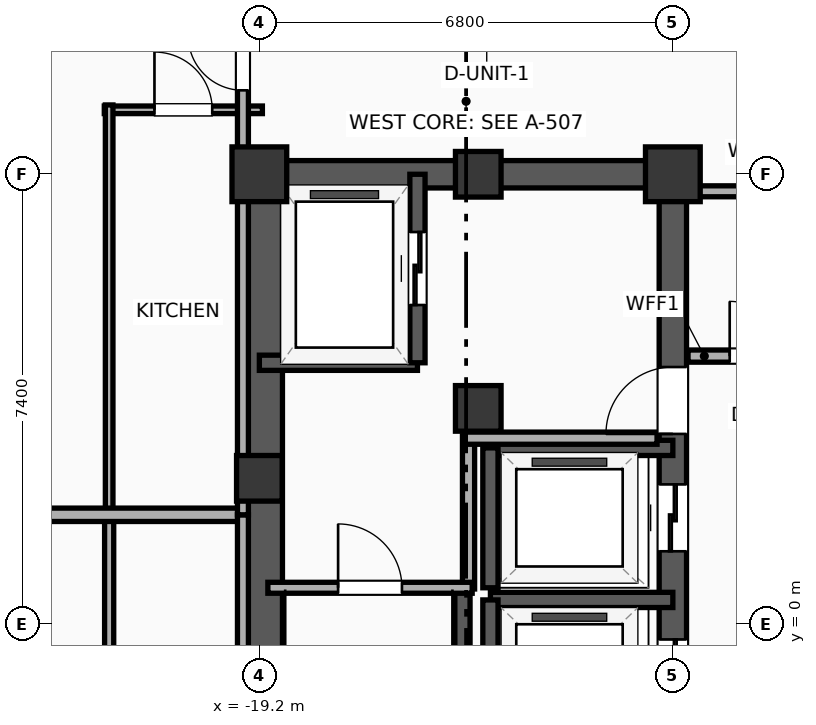
"""IFC4 building model, lengths in metres.
Left out: names, types, materials, properties, quantities, classifications, styles, units other than length and angle.
Written with IfcOpenShell. Run it as: python <this file> out.ifc"""

import sys

from ifc_helpers import new_model, si_unit, direction, frame, frame_2d, origin, origin_2d, place, context, subcontext, project, spatial, rectangle, extrude, element, fill, save


model = new_model("IFC4")
c1 = context("Model", 3, precision=1e-05, world=origin(), true_north=direction((0.0, 1.0)))
c2 = subcontext(c1, "Body", "Model", "MODEL_VIEW")
j1 = project(units=[si_unit("LENGTHUNIT", "METRE"), si_unit("PLANEANGLEUNIT", "RADIAN")], contexts=[c1])
p1 = place(None, origin())
s1 = spatial("IfcSite", under=j1, at=p1, CompositionType="ELEMENT")
p2 = place(p1, origin())
s2 = spatial("IfcBuilding", under=s1, at=p2, CompositionType="ELEMENT")
p3 = place(p2, frame((0.0, 0.0, 200.2)))
s3 = spatial("IfcBuildingStorey", under=s2, at=p3, CompositionType="ELEMENT", Elevation=200.2)
p4 = place(p3, frame((-19.2, 2.4, 0.0), z_axis=(0.0, 0.0, 1.0), x_axis=(1.0, 0.0, 0.0)))
e1 = element("IfcColumn", 1, at=p4, inside=s3, PredefinedType="COLUMN", context=c2, shape_type="SweptSolid", body=[
    extrude(rectangle(XDim=0.75, YDim=0.75, at=origin_2d()), origin(), (0.0, 0.0, 1.0), 3.9),
])
p5 = place(p3, frame((-19.2, 7.4, 0.0), z_axis=(0.0, 0.0, 1.0), x_axis=(1.0, 0.0, 0.0)))
e2 = element("IfcColumn", 2, at=p5, inside=s3, PredefinedType="COLUMN", context=c2, shape_type="SweptSolid", body=[
    extrude(rectangle(XDim=0.9, YDim=0.9, at=origin_2d()), origin(), (0.0, 0.0, 1.0), 3.9),
])
for number, where, z_axis, x_axis in (
    (3, (-15.6, 7.4, 0.0), (0.0, 0.0, 1.0), (1.0, 0.0, 0.0)),
    (4, (-15.6, 3.55, 0.0), (0.0, 0.0, 1.0), (1.0, 0.0, 0.0)),
):
    element("IfcColumn", number, at=place(p3, frame(where, z_axis=z_axis, x_axis=x_axis)), inside=s3, PredefinedType="COLUMN", context=c2, shape_type="SweptSolid", body=[
        extrude(rectangle(XDim=0.75, YDim=0.75, at=origin_2d()), origin(), (0.0, 0.0, 1.0), 3.9),
    ])
p6 = place(p3, frame((-12.4, 7.4, 0.0), z_axis=(0.0, 0.0, 1.0), x_axis=(1.0, 0.0, 0.0)))
e5 = element("IfcColumn", 5, at=p6, inside=s3, PredefinedType="COLUMN", context=c2, shape_type="SweptSolid", body=[
    extrude(rectangle(XDim=0.9, YDim=0.9, at=origin_2d()), origin(), (0.0, 0.0, 1.0), 3.9),
])
p7 = place(p3, frame((-19.425, 7.4, 0.0), z_axis=(0.0, 0.0, 1.0), x_axis=(1.0, 0.0, 0.0)))
e6 = element("IfcWall", 6, at=p7, inside=s3, PredefinedType="SHEAR", context=c2, shape_type="SweptSolid", body=[
    extrude(rectangle(XDim=7.25, YDim=0.45, at=frame_2d((3.625, 0.0))), origin(), (0.0, 0.0, 1.0), 3.65),
])
p8 = place(p3, frame((-19.145, -7.4, 0.0), z_axis=(0.0, 0.0, 1.0), x_axis=(0.0, 1.0, 0.0)))
e7 = element("IfcWall", 7, at=p8, inside=s3, PredefinedType="SHEAR", context=c2, shape_type="SweptSolid", body=[
    extrude(rectangle(XDim=14.8, YDim=0.65, at=frame_2d((7.4, 0.0))), origin(), (0.0, 0.0, 1.0), 3.65),
])
p9 = place(p3, frame((-12.4, -7.4, 0.0), z_axis=(0.0, 0.0, 1.0), x_axis=(0.0, 1.0, 0.0)))
e8 = element("IfcWall", 8, at=p9, inside=s3, PredefinedType="SHEAR", context=c2, shape_type="SweptSolid", body=[
    extrude(rectangle(XDim=14.8, YDim=0.45, at=frame_2d((7.4, 0.0))), origin(), (0.0, 0.0, 1.0), 3.65),
])
p10 = place(p9, frame((6.05, 0.0, 0.0)))
e9 = element("IfcOpeningElement", 9, at=p10, cuts=e8, PredefinedType="OPENING", context=c2, shape_type="SweptSolid", body=[
    extrude(rectangle(XDim=1.1, YDim=2.05, at=frame_2d((0.55, 1.025))), frame((0.0, 0.235, 0.0), z_axis=(0.0, -1.0, 0.0), x_axis=(1.0, 0.0, 0.0)), (0.0, 0.0, 1.0), 0.47),
])
p11 = place(p9, frame((8.6, 0.0, 0.0)))
e10 = element("IfcOpeningElement", 10, at=p11, cuts=e8, PredefinedType="OPENING", context=c2, shape_type="SweptSolid", body=[
    extrude(rectangle(XDim=1.1, YDim=2.05, at=frame_2d((0.55, 1.025))), frame((0.0, 0.235, 0.0), z_axis=(0.0, -1.0, 0.0), x_axis=(1.0, 0.0, 0.0)), (0.0, 0.0, 1.0), 0.47),
])
p12 = place(p9, frame((10.53, 0.0, 0.0)))
e11 = element("IfcOpeningElement", 11, at=p12, cuts=e8, PredefinedType="OPENING", context=c2, shape_type="SweptSolid", body=[
    extrude(rectangle(XDim=1.1, YDim=2.05, at=frame_2d((0.55, 1.025))), frame((0.0, 0.235, 0.0), z_axis=(0.0, -1.0, 0.0), x_axis=(1.0, 0.0, 0.0)), (0.0, 0.0, 1.0), 0.47),
])
p13 = place(p9, frame((2.25, 0.0, 0.0)))
e12 = element("IfcOpeningElement", 12, at=p13, cuts=e8, PredefinedType="OPENING", context=c2, shape_type="SweptSolid", body=[
    extrude(rectangle(XDim=0.9, YDim=2.05, at=frame_2d((0.45, 1.025))), frame((0.0, 0.235, 0.0), z_axis=(0.0, -1.0, 0.0), x_axis=(1.0, 0.0, 0.0)), (0.0, 0.0, 1.0), 0.47),
])
p14 = place(p3, frame((-15.86, -7.085, 0.0), z_axis=(0.0, 0.0, 1.0), x_axis=(0.0, 1.0, 0.0)))
e13 = element("IfcWall", 13, at=p14, inside=s3, PredefinedType="SOLIDWALL", context=c2, shape_type="SweptSolid", body=[
    extrude(rectangle(XDim=7.685, YDim=0.25, at=frame_2d((3.843, 0.0))), origin(), (0.0, 0.0, 1.0), 3.65),
])
p15 = place(p3, frame((-19.2, 4.3, 0.0), z_axis=(0.0, 0.0, 1.0), x_axis=(1.0, 0.0, 0.0)))
e14 = element("IfcWall", 14, at=p15, inside=s3, PredefinedType="SOLIDWALL", context=c2, shape_type="SweptSolid", body=[
    extrude(rectangle(XDim=2.6, YDim=0.25, at=frame_2d((1.3, 0.0))), origin(), (0.0, 0.0, 1.0), 3.65),
])
p16 = place(p3, frame((-16.6, 4.3, 0.0), z_axis=(0.0, 0.0, 1.0), x_axis=(0.0, 1.0, 0.0)))
e15 = element("IfcWall", 15, at=p16, inside=s3, PredefinedType="SOLIDWALL", context=c2, shape_type="SweptSolid", body=[
    extrude(rectangle(XDim=3.1, YDim=0.25, at=frame_2d((1.55, 0.0))), origin(), (0.0, 0.0, 1.0), 3.65),
])
p17 = place(p16, frame((0.95, 0.0, 0.0)))
e16 = element("IfcOpeningElement", 16, at=p17, cuts=e15, PredefinedType="OPENING", context=c2, shape_type="SweptSolid", body=[
    extrude(rectangle(XDim=1.2, YDim=2.05, at=frame_2d((0.6, 1.025))), frame((0.0, 0.135, 0.0), z_axis=(0.0, -1.0, 0.0), x_axis=(1.0, 0.0, 0.0)), (0.0, 0.0, 1.0), 0.27),
])
p18 = place(p3, frame((-12.4, 0.4, 0.0), z_axis=(0.0, 0.0, 1.0), x_axis=(-1.0, 0.0, 0.0)))
e17 = element("IfcWall", 17, at=p18, inside=s3, PredefinedType="SOLIDWALL", context=c2, shape_type="SweptSolid", body=[
    extrude(rectangle(XDim=3.0, YDim=0.25, at=frame_2d((1.5, 0.0))), origin(), (0.0, 0.0, 1.0), 3.65),
])
p19 = place(p3, frame((-15.4, 0.4, 0.0), z_axis=(0.0, 0.0, 1.0), x_axis=(0.0, -1.0, 0.0)))
e18 = element("IfcWall", 18, at=p19, inside=s3, PredefinedType="SOLIDWALL", context=c2, shape_type="SweptSolid", body=[
    extrude(rectangle(XDim=2.4, YDim=0.25, at=frame_2d((1.2, 0.0))), origin(), (0.0, 0.0, 1.0), 3.65),
])
p20 = place(p3, frame((-12.4, 2.9, 0.0), z_axis=(0.0, 0.0, 1.0), x_axis=(-1.0, 0.0, 0.0)))
e19 = element("IfcWall", 19, at=p20, inside=s3, PredefinedType="SOLIDWALL", context=c2, shape_type="SweptSolid", body=[
    extrude(rectangle(XDim=3.0, YDim=0.25, at=frame_2d((1.5, 0.0))), origin(), (0.0, 0.0, 1.0), 3.65),
])
p21 = place(p3, frame((-15.4, 2.9, 0.0), z_axis=(0.0, 0.0, 1.0), x_axis=(0.0, -1.0, 0.0)))
e20 = element("IfcWall", 20, at=p21, inside=s3, PredefinedType="SOLIDWALL", context=c2, shape_type="SweptSolid", body=[
    extrude(rectangle(XDim=2.3, YDim=0.25, at=frame_2d((1.15, 0.0))), origin(), (0.0, 0.0, 1.0), 3.65),
])
p22 = place(p3, frame((-15.76, 0.58, 0.0), z_axis=(0.0, 0.0, 1.0), x_axis=(0.0, 1.0, 0.0)))
e21 = element("IfcWall", 21, at=p22, inside=s3, PredefinedType="PARTITIONING", context=c2, shape_type="SweptSolid", body=[
    extrude(rectangle(XDim=2.52, YDim=0.2, at=frame_2d((1.26, 0.0))), origin(), (0.0, 0.0, 1.0), 3.65),
])
p23 = place(p3, frame((-15.82, 3.06, 0.0), z_axis=(0.0, 0.0, 1.0), x_axis=(1.0, 0.0, 0.0)))
e22 = element("IfcWall", 22, at=p23, inside=s3, PredefinedType="PARTITIONING", context=c2, shape_type="SweptSolid", body=[
    extrude(rectangle(XDim=3.16, YDim=0.2, at=frame_2d((1.58, 0.0))), origin(), (0.0, 0.0, 1.0), 3.65),
])
p24 = place(p3, frame((-19.06, 0.6, 0.0), z_axis=(0.0, 0.0, 1.0), x_axis=(1.0, 0.0, 0.0)))
e23 = element("IfcWall", 23, at=p24, inside=s3, PredefinedType="PARTITIONING", context=c2, shape_type="SweptSolid", body=[
    extrude(rectangle(XDim=3.36, YDim=0.18, at=frame_2d((1.68, 0.0))), origin(), (0.0, 0.0, 1.0), 3.65),
])
p25 = place(p24, frame((1.155, 0.0, 0.0)))
e24 = element("IfcOpeningElement", 24, at=p25, cuts=e23, PredefinedType="OPENING", context=c2, shape_type="SweptSolid", body=[
    extrude(rectangle(XDim=1.05, YDim=2.05, at=frame_2d((0.525, 1.025))), frame((0.0, 0.1, 0.0), z_axis=(0.0, -1.0, 0.0), x_axis=(1.0, 0.0, 0.0)), (0.0, 0.0, 1.0), 0.2),
])
p26 = place(p3, frame((-12.15, 4.41, 0.0), z_axis=(0.0, 0.0, 1.0), x_axis=(1.0, 0.0, 0.0)))
e25 = element("IfcWall", 25, at=p26, inside=s3, PredefinedType="PARTITIONING", context=c2, shape_type="SweptSolid", body=[
    extrude(rectangle(XDim=2.27, YDim=0.2, at=frame_2d((1.135, 0.0))), origin(), (0.0, 0.0, 1.0), 3.65),
])
p27 = place(p26, frame((0.685, 0.0, 0.0)))
e26 = element("IfcOpeningElement", 26, at=p27, cuts=e25, PredefinedType="OPENING", context=c2, shape_type="SweptSolid", body=[
    extrude(rectangle(XDim=0.9, YDim=2.05, at=frame_2d((0.45, 1.025))), frame((0.0, 0.11, 0.0), z_axis=(0.0, -1.0, 0.0), x_axis=(1.0, 0.0, 0.0)), (0.0, 0.0, 1.0), 0.22),
])
p28 = place(p3, frame((-12.15, 7.12, 0.0), z_axis=(0.0, 0.0, 1.0), x_axis=(1.0, 0.0, 0.0)))
e27 = element("IfcWall", 27, at=p28, inside=s3, PredefinedType="PARTITIONING", context=c2, shape_type="SweptSolid", body=[
    extrude(rectangle(XDim=2.27, YDim=0.18, at=frame_2d((1.135, 0.0))), origin(), (0.0, 0.0, 1.0), 3.65),
])
p29 = place(p3, frame((-21.67, -4.94, 0.0), z_axis=(0.0, 0.0, 1.0), x_axis=(0.0, 1.0, 0.0)))
e28 = element("IfcWall", 28, at=p29, inside=s3, PredefinedType="PLUMBINGWALL", context=c2, shape_type="SweptSolid", body=[
    extrude(rectangle(XDim=6.72, YDim=0.15, at=frame_2d((3.36, 0.0))), origin(), (0.0, 0.0, 1.0), 3.65),
])
p30 = place(p3, frame((-21.75, 8.46, 0.0), z_axis=(0.0, 0.0, 1.0), x_axis=(1.0, 0.0, 0.0)))
e29 = element("IfcWall", 29, at=p30, inside=s3, PredefinedType="PARTITIONING", context=c2, shape_type="SweptSolid", body=[
    extrude(rectangle(XDim=2.6, YDim=0.125, at=frame_2d((1.3, 0.0))), origin(), (0.0, 0.0, 1.0), 3.65),
])
p31 = place(p30, frame((0.825, 0.0, 0.0)))
e30 = element("IfcOpeningElement", 30, at=p31, cuts=e29, PredefinedType="OPENING", context=c2, shape_type="SweptSolid", body=[
    extrude(rectangle(XDim=0.95, YDim=2.05, at=frame_2d((0.475, 1.025))), frame((0.0, 0.073, 0.0), z_axis=(0.0, -1.0, 0.0), x_axis=(1.0, 0.0, 0.0)), (0.0, 0.0, 1.0), 0.145),
])
p32 = place(p3, frame((-21.67, 1.82, 0.0), z_axis=(0.0, 0.0, 1.0), x_axis=(0.0, 1.0, 0.0)))
e31 = element("IfcWall", 31, at=p32, inside=s3, PredefinedType="PARTITIONING", context=c2, shape_type="SweptSolid", body=[
    extrude(rectangle(XDim=6.72, YDim=0.125, at=frame_2d((3.36, 0.0))), origin(), (0.0, 0.0, 1.0), 3.65),
])
p33 = place(p3, frame((-19.47, 1.8, 0.0), z_axis=(0.0, 0.0, 1.0), x_axis=(-1.0, 0.0, 0.0)))
e32 = element("IfcWall", 32, at=p33, inside=s3, PredefinedType="PARTITIONING", context=c2, shape_type="SweptSolid", body=[
    extrude(rectangle(XDim=6.76, YDim=0.22, at=frame_2d((3.38, 0.0))), origin(), (0.0, 0.0, 1.0), 3.65),
])
p34 = place(p3, frame((-19.47, -18.83, 0.0), z_axis=(0.0, 0.0, 1.0), x_axis=(0.0, 1.0, 0.0)))
e33 = element("IfcWall", 33, at=p34, inside=s3, PredefinedType="PARTITIONING", context=c2, shape_type="SweptSolid", body=[
    extrude(rectangle(XDim=20.63, YDim=0.18, at=frame_2d((10.315, 0.0))), origin(), (0.0, 0.0, 1.0), 2.54),
])
p35 = place(p34, frame((9.149, 0.0, 0.0)))
e34 = element("IfcOpeningElement", 34, at=p35, cuts=e33, PredefinedType="OPENING", context=c2, shape_type="SweptSolid", body=[
    extrude(rectangle(XDim=0.9, YDim=2.05, at=frame_2d((0.45, 1.025))), frame((0.0, 0.1, 0.0), z_axis=(0.0, -1.0, 0.0), x_axis=(1.0, 0.0, 0.0)), (0.0, 0.0, 1.0), 0.2),
])
p36 = place(p3, frame((-19.47, 1.8, 0.0), z_axis=(0.0, 0.0, 1.0), x_axis=(0.0, 1.0, 0.0)))
e35 = element("IfcWall", 35, at=p36, inside=s3, PredefinedType="PARTITIONING", context=c2, shape_type="SweptSolid", body=[
    extrude(rectangle(XDim=18.23, YDim=0.18, at=frame_2d((9.115, 0.0))), origin(), (0.0, 0.0, 1.0), 2.54),
])
p37 = place(p36, frame((6.98, 0.0, 0.0)))
e36 = element("IfcOpeningElement", 36, at=p37, cuts=e35, PredefinedType="OPENING", context=c2, shape_type="SweptSolid", body=[
    extrude(rectangle(XDim=0.9, YDim=2.05, at=frame_2d((0.45, 1.025))), frame((0.0, 0.1, 0.0), z_axis=(0.0, -1.0, 0.0), x_axis=(1.0, 0.0, 0.0)), (0.0, 0.0, 1.0), 0.2),
])
p38 = place(p17, origin())
e37 = element("IfcDoor", 37, at=p38, inside=s3, OperationType="SLIDING_TO_LEFT", PredefinedType="DOOR", context=c2, shape_type="SweptSolid", body=[
    extrude(rectangle(XDim=1.2, YDim=2.05, at=frame_2d((0.6, 1.025))), frame((0.0, 0.025, 0.0), z_axis=(0.0, -1.0, 0.0), x_axis=(1.0, 0.0, 0.0)), (0.0, 0.0, 1.0), 0.05),
])
fill(e16, e37)
p39 = place(p10, origin())
e38 = element("IfcDoor", 38, at=p39, inside=s3, OperationType="SLIDING_TO_LEFT", PredefinedType="DOOR", context=c2, shape_type="SweptSolid", body=[
    extrude(rectangle(XDim=1.1, YDim=2.05, at=frame_2d((0.55, 1.025))), frame((0.0, 0.025, 0.0), z_axis=(0.0, -1.0, 0.0), x_axis=(1.0, 0.0, 0.0)), (0.0, 0.0, 1.0), 0.05),
])
fill(e9, e38)
p40 = place(p11, origin())
e39 = element("IfcDoor", 39, at=p40, inside=s3, OperationType="SLIDING_TO_LEFT", PredefinedType="DOOR", context=c2, shape_type="SweptSolid", body=[
    extrude(rectangle(XDim=1.1, YDim=2.05, at=frame_2d((0.55, 1.025))), frame((0.0, 0.025, 0.0), z_axis=(0.0, -1.0, 0.0), x_axis=(1.0, 0.0, 0.0)), (0.0, 0.0, 1.0), 0.05),
])
fill(e10, e39)
p41 = place(p25, origin())
e40 = element("IfcDoor", 40, at=p41, inside=s3, OperationType="SINGLE_SWING_LEFT", PredefinedType="DOOR", context=c2, shape_type="SweptSolid", body=[
    extrude(rectangle(XDim=1.05, YDim=2.05, at=frame_2d((0.525, 1.025))), frame((0.0, 0.025, 0.0), z_axis=(0.0, -1.0, 0.0), x_axis=(1.0, 0.0, 0.0)), (0.0, 0.0, 1.0), 0.05),
])
fill(e24, e40)
p42 = place(p27, origin())
e41 = element("IfcDoor", 41, at=p42, inside=s3, OperationType="SINGLE_SWING_LEFT", PredefinedType="DOOR", context=c2, shape_type="SweptSolid", body=[
    extrude(rectangle(XDim=0.9, YDim=2.05, at=frame_2d((0.45, 1.025))), frame((0.0, 0.025, 0.0), z_axis=(0.0, -1.0, 0.0), x_axis=(1.0, 0.0, 0.0)), (0.0, 0.0, 1.0), 0.05),
])
fill(e26, e41)
p43 = place(p31, origin())
e42 = element("IfcDoor", 42, at=p43, inside=s3, OperationType="SINGLE_SWING_LEFT", PredefinedType="DOOR", context=c2, shape_type="SweptSolid", body=[
    extrude(rectangle(XDim=0.95, YDim=2.05, at=frame_2d((0.475, 1.025))), frame((0.0, 0.025, 0.0), z_axis=(0.0, -1.0, 0.0), x_axis=(1.0, 0.0, 0.0)), (0.0, 0.0, 1.0), 0.05),
])
fill(e30, e42)
p44 = place(p37, origin())
e43 = element("IfcDoor", 43, at=p44, inside=s3, OperationType="SINGLE_SWING_RIGHT", PredefinedType="DOOR", context=c2, shape_type="SweptSolid", body=[
    extrude(rectangle(XDim=0.9, YDim=2.05, at=frame_2d((0.45, 1.025))), frame((0.0, 0.025, 0.0), z_axis=(0.0, -1.0, 0.0), x_axis=(1.0, 0.0, 0.0)), (0.0, 0.0, 1.0), 0.05),
])
fill(e36, e43)
p45 = place(p12, origin())
e44 = element("IfcDoor", 44, at=p45, inside=s3, OperationType="SINGLE_SWING_LEFT", PredefinedType="DOOR", context=c2, shape_type="SweptSolid", body=[
    extrude(rectangle(XDim=1.1, YDim=2.05, at=frame_2d((0.55, 1.025))), frame((0.0, 0.025, 0.0), z_axis=(0.0, -1.0, 0.0), x_axis=(1.0, 0.0, 0.0)), (0.0, 0.0, 1.0), 0.05),
])
fill(e11, e44)
save(model, sys.argv[1])
